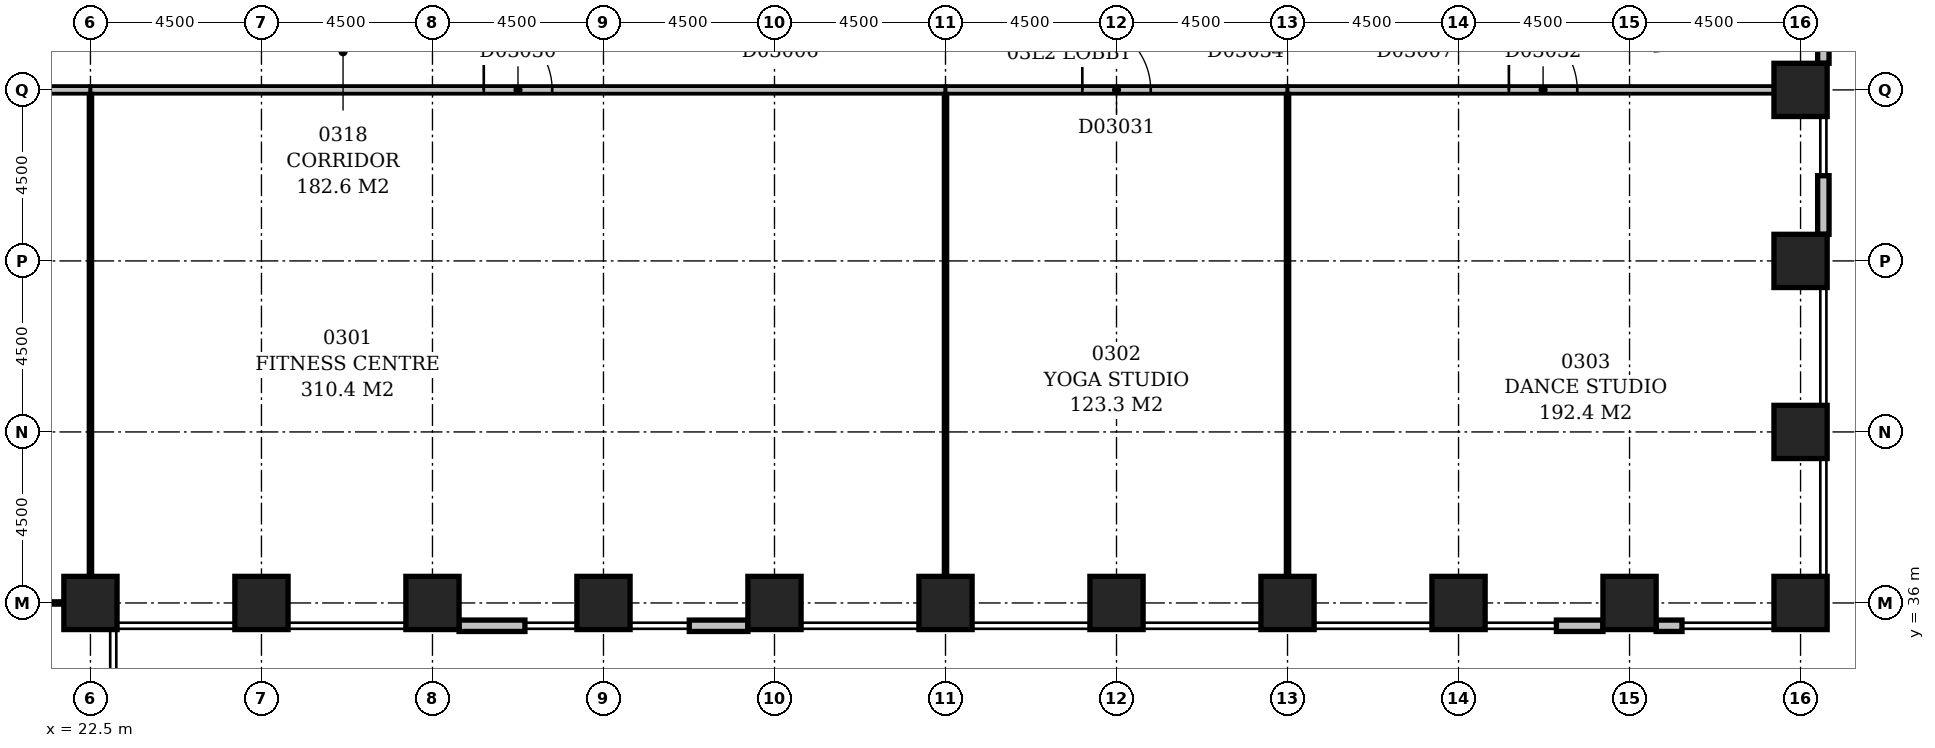
"""IFC4 building model, lengths in metres.
Left out: names, types, materials, properties, quantities, classifications, styles, units other than length and angle.
Written with IfcOpenShell. Run it as: python <this file> out.ifc"""

import sys

from ifc_helpers import new_model, si_unit, direction, frame, frame_2d, origin, origin_2d, place, context, subcontext, project, spatial, rectangle, extrude, element, fill, save


model = new_model("IFC4")
c1 = context("Model", 3, precision=1e-05, world=origin(), true_north=direction((0.0, 1.0)))
c2 = subcontext(c1, "Body", "Model", "MODEL_VIEW")
j1 = project(units=[si_unit("LENGTHUNIT", "METRE"), si_unit("PLANEANGLEUNIT", "RADIAN")], contexts=[c1])
p1 = place(None, origin())
s1 = spatial("IfcSite", under=j1, at=p1, CompositionType="ELEMENT")
p2 = place(p1, origin())
s2 = spatial("IfcBuilding", under=s1, at=p2, CompositionType="ELEMENT")
p3 = place(p2, frame((0.0, 0.0, 19.0)))
s3 = spatial("IfcBuildingStorey", under=s2, at=p3, CompositionType="ELEMENT", Elevation=19.0)
for number, where, z_axis, x_axis in (
    (1, (22.5, 36.0, -0.4), (0.0, 0.0, 1.0), (1.0, 0.0, 0.0)),
    (2, (27.0, 36.0, -0.4), (0.0, 0.0, 1.0), (1.0, 0.0, 0.0)),
    (3, (31.5, 36.0, -0.4), (0.0, 0.0, 1.0), (1.0, 0.0, 0.0)),
    (4, (36.0, 36.0, -0.4), (0.0, 0.0, 1.0), (1.0, 0.0, 0.0)),
    (5, (40.5, 36.0, -0.4), (0.0, 0.0, 1.0), (1.0, 0.0, 0.0)),
    (6, (45.0, 36.0, -0.4), (0.0, 0.0, 1.0), (1.0, 0.0, 0.0)),
    (7, (49.5, 36.0, -0.4), (0.0, 0.0, 1.0), (1.0, 0.0, 0.0)),
    (8, (54.0, 36.0, -0.4), (0.0, 0.0, 1.0), (1.0, 0.0, 0.0)),
    (9, (58.5, 36.0, -0.4), (0.0, 0.0, 1.0), (1.0, 0.0, 0.0)),
    (10, (63.0, 36.0, -0.4), (0.0, 0.0, 1.0), (1.0, 0.0, 0.0)),
    (11, (67.5, 36.0, -0.4), (0.0, 0.0, 1.0), (1.0, 0.0, 0.0)),
    (12, (67.5, 40.5, -0.4), (0.0, 0.0, 1.0), (1.0, 0.0, 0.0)),
    (13, (67.5, 45.0, -0.4), (0.0, 0.0, 1.0), (1.0, 0.0, 0.0)),
    (14, (67.5, 49.5, -0.4), (0.0, 0.0, 1.0), (1.0, 0.0, 0.0)),
):
    element("IfcColumn", number, at=place(p3, frame(where, z_axis=z_axis, x_axis=x_axis)), inside=s3, PredefinedType="COLUMN", context=c2, shape_type="SweptSolid", body=[
        extrude(rectangle(XDim=1.4, YDim=1.4, at=origin_2d()), origin(), (0.0, 0.0, 1.0), 4.95),
    ])
p4 = place(p3, frame((32.2, 35.4, 0.0), z_axis=(0.0, 0.0, 1.0), x_axis=(1.0, 0.0, 0.0)))
e15 = element("IfcWall", 15, at=p4, inside=s3, PredefinedType="STANDARD", context=c2, shape_type="SweptSolid", body=[
    extrude(rectangle(XDim=1.733, YDim=0.3, at=frame_2d((0.866, 0.0))), origin(), (0.0, 0.0, 1.0), 3.9),
])
p5 = place(p3, frame((38.258, 35.4, 0.0), z_axis=(0.0, 0.0, 1.0), x_axis=(1.0, 0.0, 0.0)))
e16 = element("IfcWall", 16, at=p5, inside=s3, PredefinedType="STANDARD", context=c2, shape_type="SweptSolid", body=[
    extrude(rectangle(XDim=1.542, YDim=0.3, at=frame_2d((0.771, 0.0))), origin(), (0.0, 0.0, 1.0), 3.9),
])
p6 = place(p3, frame((61.075, 35.4, 0.0), z_axis=(0.0, 0.0, 1.0), x_axis=(1.0, 0.0, 0.0)))
e17 = element("IfcWall", 17, at=p6, inside=s3, PredefinedType="STANDARD", context=c2, shape_type="SweptSolid", body=[
    extrude(rectangle(XDim=1.225, YDim=0.3, at=frame_2d((0.612, 0.0))), origin(), (0.0, 0.0, 1.0), 3.9),
])
p7 = place(p3, frame((63.7, 35.4, 0.0), z_axis=(0.0, 0.0, 1.0), x_axis=(1.0, 0.0, 0.0)))
e18 = element("IfcWall", 18, at=p7, inside=s3, PredefinedType="STANDARD", context=c2, shape_type="SweptSolid", body=[
    extrude(rectangle(XDim=0.68, YDim=0.3, at=frame_2d((0.34, 0.0))), origin(), (0.0, 0.0, 1.0), 3.9),
])
p8 = place(p3, frame((68.1, 45.7, 0.0), z_axis=(0.0, 0.0, 1.0), x_axis=(0.0, 1.0, 0.0)))
e19 = element("IfcWall", 19, at=p8, inside=s3, PredefinedType="STANDARD", context=c2, shape_type="SweptSolid", body=[
    extrude(rectangle(XDim=1.542, YDim=0.3, at=frame_2d((0.771, 0.0))), origin(), (0.0, 0.0, 1.0), 3.9),
])
p9 = place(p3, frame((68.1, 50.2, 0.0), z_axis=(0.0, 0.0, 1.0), x_axis=(0.0, 1.0, 0.0)))
e20 = element("IfcWall", 20, at=p9, inside=s3, PredefinedType="STANDARD", context=c2, shape_type="SweptSolid", body=[
    extrude(rectangle(XDim=3.1, YDim=0.3, at=frame_2d((1.55, 0.0))), origin(), (0.0, 0.0, 1.0), 3.9),
])
p10 = place(p3, frame((22.5, 35.35, 0.0), z_axis=(0.0, 0.0, 1.0), x_axis=(0.0, 1.0, 0.0)))
e21 = element("IfcWall", 21, at=p10, inside=s3, PredefinedType="PARTITIONING", context=c2, shape_type="SweptSolid", body=[
    extrude(rectangle(XDim=0.6, YDim=0.1, at=frame_2d((0.3, 0.0))), origin(), (0.0, 0.0, 1.0), 3.9),
])
p11 = place(p3, frame((22.55, 36.0, 0.0), z_axis=(0.0, 0.0, 1.0), x_axis=(-1.0, 0.0, 0.0)))
e22 = element("IfcWall", 22, at=p11, inside=s3, PredefinedType="PARTITIONING", context=c2, shape_type="SweptSolid", body=[
    extrude(rectangle(XDim=6.85, YDim=0.1, at=frame_2d((3.425, 0.0))), origin(), (0.0, 0.0, 1.0), 3.65),
])
p12 = place(p3, frame((22.5, 36.05, 0.0), z_axis=(0.0, 0.0, 1.0), x_axis=(0.0, 1.0, 0.0)))
e23 = element("IfcWall", 23, at=p12, inside=s3, PredefinedType="PARTITIONING", context=c2, shape_type="SweptSolid", body=[
    extrude(rectangle(XDim=13.35, YDim=0.1, at=frame_2d((6.675, 0.0))), origin(), (0.0, 0.0, 1.0), 4.55),
])
p13 = place(p3, frame((15.75, 49.5, 0.0), z_axis=(0.0, 0.0, 1.0), x_axis=(1.0, 0.0, 0.0)))
e24 = element("IfcWall", 24, at=p13, inside=s3, PredefinedType="PARTITIONING", context=c2, shape_type="SweptSolid", body=[
    extrude(rectangle(XDim=6.75, YDim=0.2, at=frame_2d((3.375, 0.0))), origin(), (0.0, 0.0, 1.0), 4.55),
])
p14 = place(p13, frame((2.925, 0.0, 0.0)))
e25 = element("IfcOpeningElement", 25, at=p14, cuts=e24, PredefinedType="OPENING", context=c2, shape_type="SweptSolid", body=[
    extrude(rectangle(XDim=0.9, YDim=2.1, at=frame_2d((0.45, 1.05))), frame((0.0, 0.112, 0.0), z_axis=(0.0, -1.0, 0.0), x_axis=(1.0, 0.0, 0.0)), (0.0, 0.0, 1.0), 0.224),
])
p15 = place(p3, frame((22.5, 49.5, 0.0), z_axis=(0.0, 0.0, 1.0), x_axis=(1.0, 0.0, 0.0)))
e26 = element("IfcWall", 26, at=p15, inside=s3, PredefinedType="PARTITIONING", context=c2, shape_type="SweptSolid", body=[
    extrude(rectangle(XDim=22.5, YDim=0.2, at=frame_2d((11.25, 0.0))), origin(), (0.0, 0.0, 1.0), 4.55),
])
p16 = place(p15, frame((10.35, 0.0, 0.0)))
e27 = element("IfcOpeningElement", 27, at=p16, cuts=e26, PredefinedType="OPENING", context=c2, shape_type="SweptSolid", body=[
    extrude(rectangle(XDim=1.8, YDim=2.4, at=frame_2d((0.9, 1.2))), frame((0.0, 0.112, 0.0), z_axis=(0.0, -1.0, 0.0), x_axis=(1.0, 0.0, 0.0)), (0.0, 0.0, 1.0), 0.224),
])
p17 = place(p3, frame((45.0, 49.4, 0.0), z_axis=(0.0, 0.0, 1.0), x_axis=(0.0, -1.0, 0.0)))
e28 = element("IfcWall", 28, at=p17, inside=s3, PredefinedType="PARTITIONING", context=c2, shape_type="SweptSolid", body=[
    extrude(rectangle(XDim=13.4, YDim=0.1, at=frame_2d((6.7, 0.0))), origin(), (0.0, 0.0, 1.0), 3.85),
])
p18 = place(p3, frame((45.0, 49.5, 0.0), z_axis=(0.0, 0.0, 1.0), x_axis=(1.0, 0.0, 0.0)))
e29 = element("IfcWall", 29, at=p18, inside=s3, PredefinedType="PARTITIONING", context=c2, shape_type="SweptSolid", body=[
    extrude(rectangle(XDim=9.0, YDim=0.2, at=frame_2d((4.5, 0.0))), origin(), (0.0, 0.0, 1.0), 4.55),
])
p19 = place(p18, frame((3.6, 0.0, 0.0)))
e30 = element("IfcOpeningElement", 30, at=p19, cuts=e29, PredefinedType="OPENING", context=c2, shape_type="SweptSolid", body=[
    extrude(rectangle(XDim=1.8, YDim=2.4, at=frame_2d((0.9, 1.2))), frame((0.0, 0.112, 0.0), z_axis=(0.0, -1.0, 0.0), x_axis=(1.0, 0.0, 0.0)), (0.0, 0.0, 1.0), 0.224),
])
p20 = place(p3, frame((54.0, 49.4, 0.0), z_axis=(0.0, 0.0, 1.0), x_axis=(0.0, -1.0, 0.0)))
e31 = element("IfcWall", 31, at=p20, inside=s3, PredefinedType="PARTITIONING", context=c2, shape_type="SweptSolid", body=[
    extrude(rectangle(XDim=13.4, YDim=0.1, at=frame_2d((6.7, 0.0))), origin(), (0.0, 0.0, 1.0), 3.85),
])
p21 = place(p3, frame((54.0, 49.5, 0.0), z_axis=(0.0, 0.0, 1.0), x_axis=(1.0, 0.0, 0.0)))
e32 = element("IfcWall", 32, at=p21, inside=s3, PredefinedType="PARTITIONING", context=c2, shape_type="SweptSolid", body=[
    extrude(rectangle(XDim=13.5, YDim=0.2, at=frame_2d((6.75, 0.0))), origin(), (0.0, 0.0, 1.0), 4.55),
])
p22 = place(p21, frame((5.825, 0.0, 0.0)))
e33 = element("IfcOpeningElement", 33, at=p22, cuts=e32, PredefinedType="OPENING", context=c2, shape_type="SweptSolid", body=[
    extrude(rectangle(XDim=1.8, YDim=2.4, at=frame_2d((0.9, 1.2))), frame((0.0, 0.112, 0.0), z_axis=(0.0, -1.0, 0.0), x_axis=(1.0, 0.0, 0.0)), (0.0, 0.0, 1.0), 0.224),
])
p23 = place(p16, origin())
e34 = element("IfcDoor", 34, at=p23, inside=s3, OperationType="DOUBLE_DOOR_SINGLE_SWING", PredefinedType="DOOR", context=c2, shape_type="SweptSolid", body=[
    extrude(rectangle(XDim=1.8, YDim=2.4, at=frame_2d((0.9, 1.2))), frame((0.0, 0.025, 0.0), z_axis=(0.0, -1.0, 0.0), x_axis=(1.0, 0.0, 0.0)), (0.0, 0.0, 1.0), 0.05),
])
fill(e27, e34)
p24 = place(p19, origin())
e35 = element("IfcDoor", 35, at=p24, inside=s3, OperationType="DOUBLE_DOOR_SINGLE_SWING", PredefinedType="DOOR", context=c2, shape_type="SweptSolid", body=[
    extrude(rectangle(XDim=1.8, YDim=2.4, at=frame_2d((0.9, 1.2))), frame((0.0, 0.025, 0.0), z_axis=(0.0, -1.0, 0.0), x_axis=(1.0, 0.0, 0.0)), (0.0, 0.0, 1.0), 0.05),
])
fill(e30, e35)
p25 = place(p22, origin())
e36 = element("IfcDoor", 36, at=p25, inside=s3, OperationType="DOUBLE_DOOR_SINGLE_SWING", PredefinedType="DOOR", context=c2, shape_type="SweptSolid", body=[
    extrude(rectangle(XDim=1.8, YDim=2.4, at=frame_2d((0.9, 1.2))), frame((0.0, 0.025, 0.0), z_axis=(0.0, -1.0, 0.0), x_axis=(1.0, 0.0, 0.0)), (0.0, 0.0, 1.0), 0.05),
])
fill(e33, e36)
save(model, sys.argv[1])
